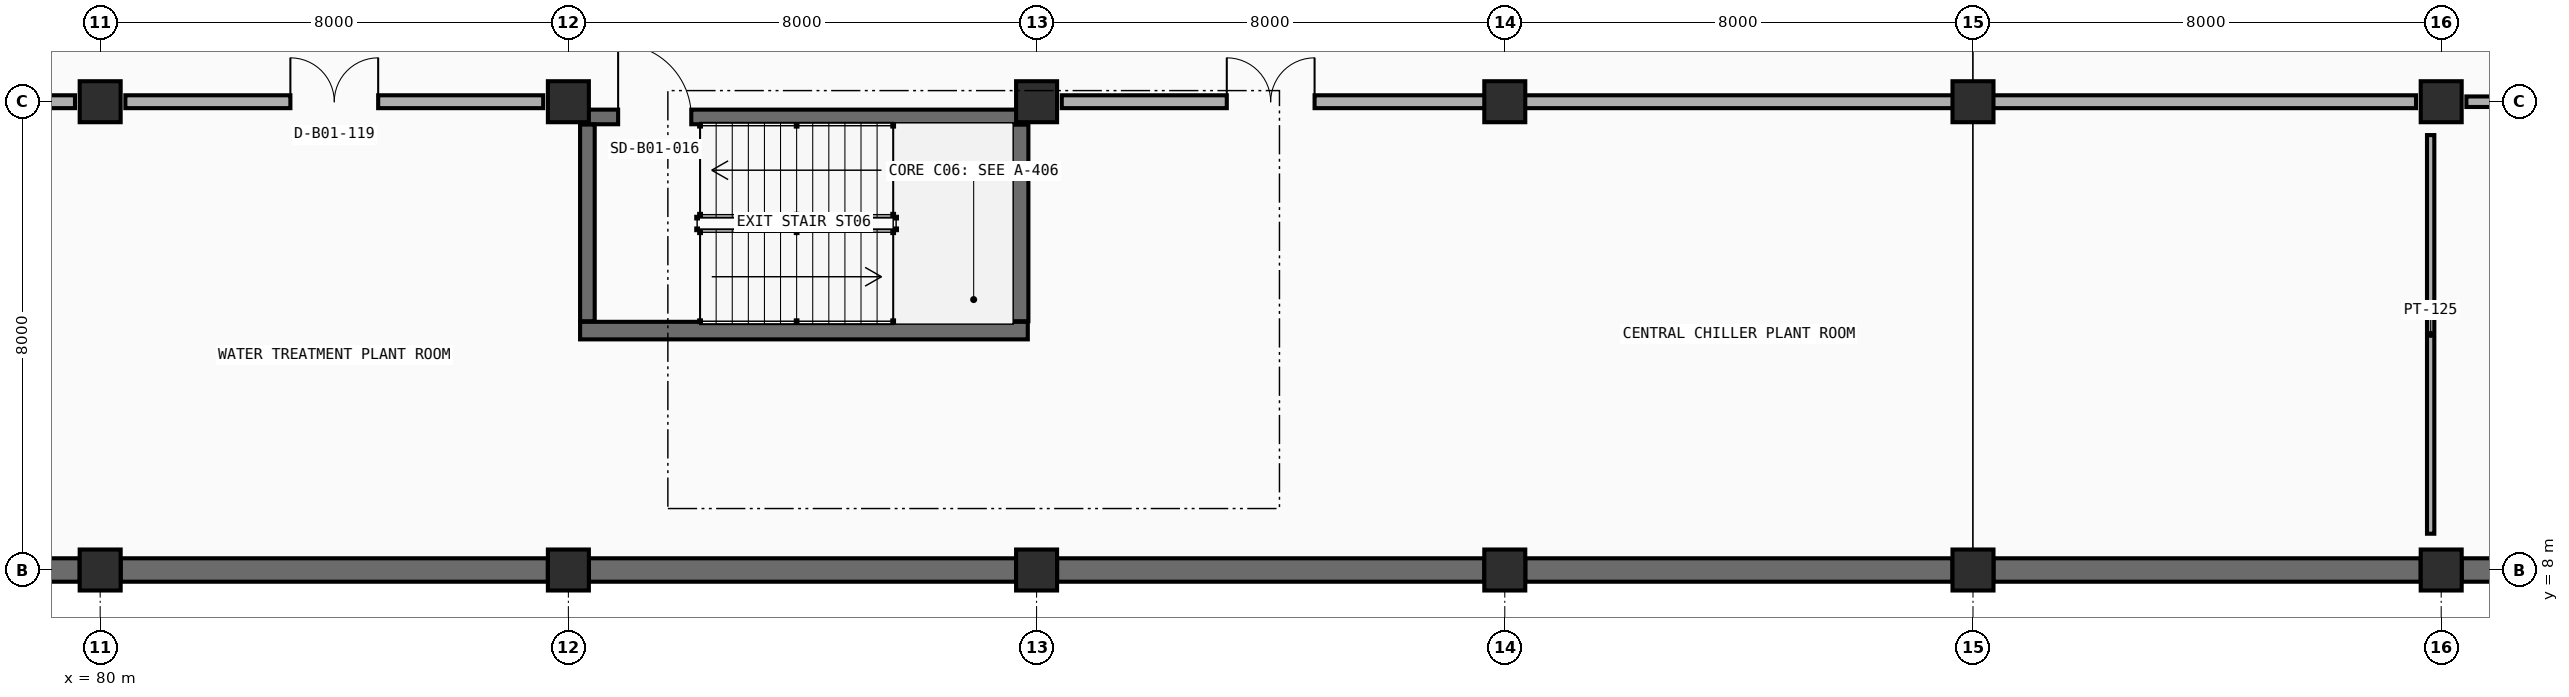
"""IFC4 building model, lengths in metres.
Left out: names, types, materials, properties, quantities, classifications, styles, units other than length and angle.
Written with IfcOpenShell. Run it as: python <this file> out.ifc"""

import sys

from ifc_helpers import new_model, si_unit, direction, frame, frame_2d, origin, origin_2d, place, context, subcontext, project, spatial, rectangle, extrude, element, fill, save


model = new_model("IFC4")
c1 = context("Model", 3, precision=1e-05, world=origin(), true_north=direction((0.0, 1.0)))
c2 = subcontext(c1, "Body", "Model", "MODEL_VIEW")
j1 = project(units=[si_unit("LENGTHUNIT", "METRE"), si_unit("PLANEANGLEUNIT", "RADIAN")], contexts=[c1])
p1 = place(None, origin())
s1 = spatial("IfcSite", under=j1, at=p1, CompositionType="ELEMENT")
p2 = place(p1, origin())
s2 = spatial("IfcBuilding", under=s1, at=p2, CompositionType="ELEMENT")
p3 = place(p2, frame((0.0, 0.0, -4.5)))
s3 = spatial("IfcBuildingStorey", under=s2, at=p3, CompositionType="ELEMENT", Elevation=-4.5)
for number, where, z_axis, x_axis in (
    (1, (80.0, 8.0, -0.405), (0.0, 0.0, 1.0), (1.0, 0.0, 0.0)),
    (2, (88.0, 8.0, -0.405), (0.0, 0.0, 1.0), (1.0, 0.0, 0.0)),
    (3, (96.0, 8.0, -0.405), (0.0, 0.0, 1.0), (1.0, 0.0, 0.0)),
    (4, (104.0, 8.0, -0.405), (0.0, 0.0, 1.0), (1.0, 0.0, 0.0)),
    (5, (112.0, 8.0, -0.405), (0.0, 0.0, 1.0), (1.0, 0.0, 0.0)),
    (6, (120.0, 8.0, -0.405), (0.0, 0.0, 1.0), (1.0, 0.0, 0.0)),
    (7, (80.0, 16.0, -0.405), (0.0, 0.0, 1.0), (1.0, 0.0, 0.0)),
    (8, (88.0, 16.0, -0.405), (0.0, 0.0, 1.0), (1.0, 0.0, 0.0)),
    (9, (96.0, 16.0, -0.405), (0.0, 0.0, 1.0), (1.0, 0.0, 0.0)),
    (10, (104.0, 16.0, -0.405), (0.0, 0.0, 1.0), (1.0, 0.0, 0.0)),
    (11, (112.0, 16.0, -0.405), (0.0, 0.0, 1.0), (1.0, 0.0, 0.0)),
    (12, (120.0, 16.0, -0.405), (0.0, 0.0, 1.0), (1.0, 0.0, 0.0)),
):
    element("IfcColumn", number, at=place(p3, frame(where, z_axis=z_axis, x_axis=x_axis)), inside=s3, PredefinedType="COLUMN", context=c2, shape_type="SweptSolid", body=[
        extrude(rectangle(XDim=0.7, YDim=0.7, at=origin_2d()), origin(), (0.0, 0.0, 1.0), 4.905),
    ])
for number, where, z_axis, x_axis in (
    (13, (79.65, 8.0, 0.0), (0.0, 0.0, 1.0), (-1.0, 0.0, 0.0)),
    (14, (87.65, 8.0, 0.0), (0.0, 0.0, 1.0), (-1.0, 0.0, 0.0)),
    (15, (95.65, 8.0, 0.0), (0.0, 0.0, 1.0), (-1.0, 0.0, 0.0)),
    (16, (103.65, 8.0, 0.0), (0.0, 0.0, 1.0), (-1.0, 0.0, 0.0)),
    (17, (111.65, 8.0, 0.0), (0.0, 0.0, 1.0), (-1.0, 0.0, 0.0)),
    (18, (119.65, 8.0, 0.0), (0.0, 0.0, 1.0), (-1.0, 0.0, 0.0)),
    (19, (127.65, 8.0, 0.0), (0.0, 0.0, 1.0), (-1.0, 0.0, 0.0)),
):
    element("IfcWall", number, at=place(p3, frame(where, z_axis=z_axis, x_axis=x_axis)), inside=s3, PredefinedType="USERDEFINED", context=c2, shape_type="SweptSolid", body=[
        extrude(rectangle(XDim=7.3, YDim=0.4, at=frame_2d((3.65, 0.0))), origin(), (0.0, 0.0, 1.0), 4.095),
    ])
p4 = place(p3, frame((88.2, 12.09, 0.0), z_axis=(0.0, 0.0, 1.0), x_axis=(1.0, 0.0, 0.0)))
e20 = element("IfcWall", 20, at=p4, inside=s3, PredefinedType="SHEAR", context=c2, shape_type="SweptSolid", body=[
    extrude(rectangle(XDim=7.65, YDim=0.3, at=frame_2d((3.825, 0.0))), origin(), (0.0, 0.0, 1.0), 4.5),
])
p5 = place(p3, frame((95.71, 12.25, 0.0), z_axis=(0.0, 0.0, 1.0), x_axis=(0.0, 1.0, 0.0)))
e21 = element("IfcWall", 21, at=p5, inside=s3, PredefinedType="SHEAR", context=c2, shape_type="SweptSolid", body=[
    extrude(rectangle(XDim=3.36, YDim=0.3, at=frame_2d((1.68, 0.0))), origin(), (0.0, 0.0, 1.0), 4.5),
])
p6 = place(p3, frame((88.2, 15.74, 0.0), z_axis=(0.0, 0.0, 1.0), x_axis=(1.0, 0.0, 0.0)))
e22 = element("IfcWall", 22, at=p6, inside=s3, PredefinedType="SOLIDWALL", context=c2, shape_type="SweptSolid", body=[
    extrude(rectangle(XDim=7.65, YDim=0.25, at=frame_2d((3.825, 0.0))), origin(), (0.0, 0.0, 1.0), 4.5),
])
p7 = place(p6, frame((0.65, 0.0, 0.0)))
e23 = element("IfcOpeningElement", 23, at=p7, cuts=e22, PredefinedType="OPENING", context=c2, shape_type="SweptSolid", body=[
    extrude(rectangle(XDim=1.25, YDim=2.15, at=frame_2d((0.625, 1.075))), frame((0.0, 0.135, 0.0), z_axis=(0.0, -1.0, 0.0), x_axis=(1.0, 0.0, 0.0)), (0.0, 0.0, 1.0), 0.27),
])
p8 = place(p3, frame((88.325, 12.25, 0.0), z_axis=(0.0, 0.0, 1.0), x_axis=(0.0, 1.0, 0.0)))
e24 = element("IfcWall", 24, at=p8, inside=s3, PredefinedType="SOLIDWALL", context=c2, shape_type="SweptSolid", body=[
    extrude(rectangle(XDim=3.36, YDim=0.25, at=frame_2d((1.68, 0.0))), origin(), (0.0, 0.0, 1.0), 4.5),
])
p9 = place(p3, frame((56.43, 16.0, 0.0), z_axis=(0.0, 0.0, 1.0), x_axis=(1.0, 0.0, 0.0)))
e25 = element("IfcWall", 25, at=p9, inside=s3, PredefinedType="PARTITIONING", context=c2, shape_type="SweptSolid", body=[
    extrude(rectangle(XDim=23.14, YDim=0.22, at=frame_2d((11.57, 0.0))), origin(), (0.0, 0.0, 1.0), 3.37),
])
p10 = place(p9, frame((2.82, 0.0, 0.0)))
e26 = element("IfcOpeningElement", 26, at=p10, cuts=e25, PredefinedType="OPENING", context=c2, shape_type="SweptSolid", body=[
    extrude(rectangle(XDim=1.5, YDim=2.2, at=frame_2d((0.75, 1.1))), frame((0.0, 0.12, 0.0), z_axis=(0.0, -1.0, 0.0), x_axis=(1.0, 0.0, 0.0)), (0.0, 0.0, 1.0), 0.24),
])
p11 = place(p3, frame((80.43, 16.0, 0.0), z_axis=(0.0, 0.0, 1.0), x_axis=(1.0, 0.0, 0.0)))
e27 = element("IfcWall", 27, at=p11, inside=s3, PredefinedType="PARTITIONING", context=c2, shape_type="SweptSolid", body=[
    extrude(rectangle(XDim=7.14, YDim=0.22, at=frame_2d((3.57, 0.0))), origin(), (0.0, 0.0, 1.0), 3.37),
])
p12 = place(p11, frame((2.82, 0.0, 0.0)))
e28 = element("IfcOpeningElement", 28, at=p12, cuts=e27, PredefinedType="OPENING", context=c2, shape_type="SweptSolid", body=[
    extrude(rectangle(XDim=1.5, YDim=2.2, at=frame_2d((0.75, 1.1))), frame((0.0, 0.12, 0.0), z_axis=(0.0, -1.0, 0.0), x_axis=(1.0, 0.0, 0.0)), (0.0, 0.0, 1.0), 0.24),
])
p13 = place(p3, frame((96.43, 16.0, 0.0), z_axis=(0.0, 0.0, 1.0), x_axis=(1.0, 0.0, 0.0)))
e29 = element("IfcWall", 29, at=p13, inside=s3, PredefinedType="PARTITIONING", context=c2, shape_type="SweptSolid", body=[
    extrude(rectangle(XDim=23.14, YDim=0.22, at=frame_2d((11.57, 0.0))), origin(), (0.0, 0.0, 1.0), 3.37),
])
p14 = place(p13, frame((2.82, 0.0, 0.0)))
e30 = element("IfcOpeningElement", 30, at=p14, cuts=e29, PredefinedType="OPENING", context=c2, shape_type="SweptSolid", body=[
    extrude(rectangle(XDim=1.5, YDim=2.2, at=frame_2d((0.75, 1.1))), frame((0.0, 0.12, 0.0), z_axis=(0.0, -1.0, 0.0), x_axis=(1.0, 0.0, 0.0)), (0.0, 0.0, 1.0), 0.24),
])
p15 = place(p3, frame((119.82, 8.62, 0.0), z_axis=(0.0, 0.0, 1.0), x_axis=(0.0, 1.0, 0.0)))
e31 = element("IfcWall", 31, at=p15, inside=s3, PredefinedType="PARTITIONING", context=c2, shape_type="SweptSolid", body=[
    extrude(rectangle(XDim=6.81, YDim=0.125, at=frame_2d((3.405, 0.0))), origin(), (0.0, 0.0, 1.0), 3.27),
])
p16 = place(p3, frame((120.43, 16.0, 0.0), z_axis=(0.0, 0.0, 1.0), x_axis=(1.0, 0.0, 0.0)))
e32 = element("IfcWall", 32, at=p16, inside=s3, PredefinedType="PARTITIONING", context=c2, shape_type="SweptSolid", body=[
    extrude(rectangle(XDim=23.14, YDim=0.18, at=frame_2d((11.57, 0.0))), origin(), (0.0, 0.0, 1.0), 3.37),
])
p17 = place(p16, frame((2.65, 0.0, 0.0)))
e33 = element("IfcOpeningElement", 33, at=p17, cuts=e32, PredefinedType="OPENING", context=c2, shape_type="SweptSolid", body=[
    extrude(rectangle(XDim=1.84, YDim=2.25, at=frame_2d((0.92, 1.125))), frame((0.0, 0.1, 0.0), z_axis=(0.0, -1.0, 0.0), x_axis=(1.0, 0.0, 0.0)), (0.0, 0.0, 1.0), 0.2),
])
p18 = place(p7, origin())
e34 = element("IfcDoor", 34, at=p18, inside=s3, OperationType="SINGLE_SWING_LEFT", PredefinedType="DOOR", context=c2, shape_type="SweptSolid", body=[
    extrude(rectangle(XDim=1.25, YDim=2.15, at=frame_2d((0.625, 1.075))), frame((0.0, 0.025, 0.0), z_axis=(0.0, -1.0, 0.0), x_axis=(1.0, 0.0, 0.0)), (0.0, 0.0, 1.0), 0.05),
])
fill(e23, e34)
p19 = place(p12, origin())
e35 = element("IfcDoor", 35, at=p19, inside=s3, OperationType="DOUBLE_DOOR_SINGLE_SWING", PredefinedType="DOOR", context=c2, shape_type="SweptSolid", body=[
    extrude(rectangle(XDim=1.5, YDim=2.2, at=frame_2d((0.75, 1.1))), frame((0.0, 0.025, 0.0), z_axis=(0.0, -1.0, 0.0), x_axis=(1.0, 0.0, 0.0)), (0.0, 0.0, 1.0), 0.05),
])
fill(e28, e35)
p20 = place(p14, origin())
e36 = element("IfcDoor", 36, at=p20, inside=s3, OperationType="DOUBLE_DOOR_SINGLE_SWING", PredefinedType="DOOR", context=c2, shape_type="SweptSolid", body=[
    extrude(rectangle(XDim=1.5, YDim=2.2, at=frame_2d((0.75, 1.1))), frame((0.0, 0.025, 0.0), z_axis=(0.0, -1.0, 0.0), x_axis=(1.0, 0.0, 0.0)), (0.0, 0.0, 1.0), 0.05),
])
fill(e30, e36)
save(model, sys.argv[1])
